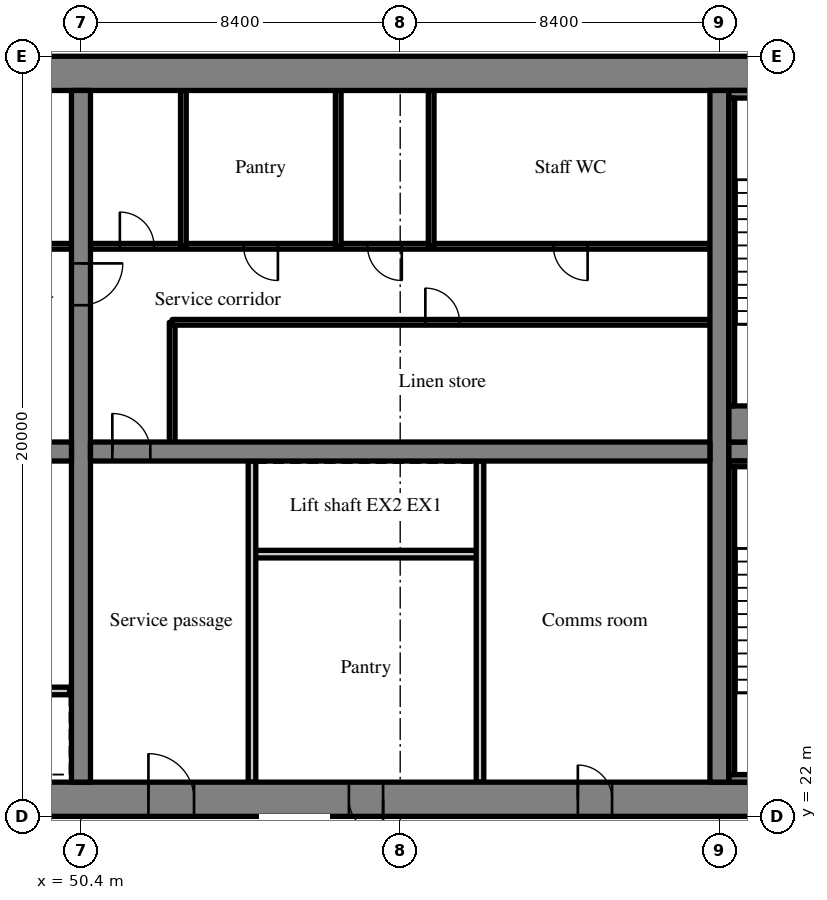
"""IFC4 building model, lengths in metres.
Left out: names, types, materials, properties, quantities, classifications, styles, units other than length and angle.
Written with IfcOpenShell. Run it as: python <this file> out.ifc"""

import sys

from ifc_helpers import new_model, si_unit, direction, frame, frame_2d, origin, place, context, subcontext, project, spatial, rectangle, extrude, source, transform, mapped, element, fill, save


model = new_model("IFC4")
c1 = context("Model", 3, precision=1e-05, world=origin(), true_north=direction((0.0, 1.0)))
c2 = subcontext(c1, "Body", "Model", "MODEL_VIEW")
j1 = project(units=[si_unit("LENGTHUNIT", "METRE"), si_unit("PLANEANGLEUNIT", "RADIAN")], contexts=[c1])
p1 = place(None, origin())
s1 = spatial("IfcSite", under=j1, at=p1, CompositionType="ELEMENT")
p2 = place(p1, origin())
s2 = spatial("IfcBuilding", under=s1, at=p2, CompositionType="ELEMENT")
p3 = place(p2, frame((0.0, 0.0, 99.0)))
s3 = spatial("IfcBuildingStorey", under=s2, at=p3, CompositionType="ELEMENT", Elevation=99.0)
m1 = source(origin(), c2, "Body", "SweptSolid", [
    extrude(rectangle(XDim=50.4, YDim=0.9, at=frame_2d((25.2, 0.0))), origin(), (0.0, 0.0, 1.0), 3.52),
])
p4 = place(p3, frame((25.2, 22.45, 0.0), z_axis=(0.0, 0.0, 1.0), x_axis=(1.0, 0.0, 0.0)))
e1 = element("IfcWall", 1, at=p4, inside=s3, PredefinedType="SHEAR", context=c2, shape_type="MappedRepresentation", body=[
    mapped(m1, transform((0.0, 0.0, 0.0), scale=1.0)),
])
m2 = source(origin(), c2, "Body", "SweptSolid", [
    extrude(rectangle(XDim=1.8, YDim=2.1, at=frame_2d((0.9, 1.05))), frame((0.0, 0.46, 0.0), z_axis=(0.0, -1.0, 0.0), x_axis=(1.0, 0.0, 0.0)), (0.0, 0.0, 1.0), 0.92),
])
p5 = place(p4, frame((15.9, 0.0, 0.0)))
e2 = element("IfcOpeningElement", 2, at=p5, cuts=e1, PredefinedType="OPENING", context=c2, shape_type="MappedRepresentation", body=[
    mapped(m2, transform((0.0, 0.0, 0.0), scale=1.0)),
])
m3 = source(origin(), c2, "Body", "SweptSolid", [
    extrude(rectangle(XDim=1.2, YDim=2.1, at=frame_2d((0.6, 1.05))), frame((0.0, 0.46, 0.0), z_axis=(0.0, -1.0, 0.0), x_axis=(1.0, 0.0, 0.0)), (0.0, 0.0, 1.0), 0.92),
])
p6 = place(p4, frame((26.975, 0.0, 0.0)))
e3 = element("IfcOpeningElement", 3, at=p6, cuts=e1, PredefinedType="OPENING", context=c2, shape_type="MappedRepresentation", body=[
    mapped(m3, transform((0.0, 0.0, 0.0), scale=1.0)),
])
m4 = source(origin(), c2, "Body", "SweptSolid", [
    extrude(rectangle(XDim=0.9, YDim=2.1, at=frame_2d((0.45, 1.05))), frame((0.0, 0.46, 0.0), z_axis=(0.0, -1.0, 0.0), x_axis=(1.0, 0.0, 0.0)), (0.0, 0.0, 1.0), 0.92),
])
p7 = place(p4, frame((32.25, 0.0, 0.0)))
e4 = element("IfcOpeningElement", 4, at=p7, cuts=e1, PredefinedType="OPENING", context=c2, shape_type="MappedRepresentation", body=[
    mapped(m4, transform((0.0, 0.0, 0.0), scale=1.0)),
])
p8 = place(p4, frame((38.275, 0.0, 0.0)))
e5 = element("IfcOpeningElement", 5, at=p8, cuts=e1, PredefinedType="OPENING", context=c2, shape_type="MappedRepresentation", body=[
    mapped(m4, transform((0.0, 0.0, 0.0), scale=1.0)),
])
p9 = place(p4, frame((6.45, 0.0, 0.0)))
e6 = element("IfcOpeningElement", 6, at=p9, cuts=e1, PredefinedType="OPENING", context=c2, shape_type="MappedRepresentation", body=[
    mapped(m3, transform((0.0, 0.0, 0.0), scale=1.0)),
])
p10 = place(p4, frame((47.775, 0.0, 0.0)))
e7 = element("IfcOpeningElement", 7, at=p10, cuts=e1, PredefinedType="OPENING", context=c2, shape_type="MappedRepresentation", body=[
    mapped(m3, transform((0.0, 0.0, 0.0), scale=1.0)),
])
p11 = place(p3, frame((25.2, 41.55, 0.0), z_axis=(0.0, 0.0, 1.0), x_axis=(1.0, 0.0, 0.0)))
e8 = element("IfcWall", 8, at=p11, inside=s3, PredefinedType="SHEAR", context=c2, shape_type="MappedRepresentation", body=[
    mapped(m1, transform((0.0, 0.0, 0.0), scale=1.0)),
])
m5 = source(origin(), c2, "Body", "SweptSolid", [
    extrude(rectangle(XDim=18.2, YDim=0.5, at=frame_2d((9.1, 0.0))), origin(), (0.0, 0.0, 1.0), 3.52),
])
p12 = place(p3, frame((50.4, 22.9, 0.0), z_axis=(0.0, 0.0, 1.0), x_axis=(0.0, 1.0, 0.0)))
e9 = element("IfcWall", 9, at=p12, inside=s3, PredefinedType="SHEAR", context=c2, shape_type="MappedRepresentation", body=[
    mapped(m5, transform((0.0, 0.0, 0.0), scale=1.0)),
])
m6 = source(origin(), c2, "Body", "SweptSolid", [
    extrude(rectangle(XDim=1.1, YDim=2.1, at=frame_2d((0.55, 1.05))), frame((0.0, 0.26, 0.0), z_axis=(0.0, -1.0, 0.0), x_axis=(1.0, 0.0, 0.0)), (0.0, 0.0, 1.0), 0.52),
])
p13 = place(p12, frame((12.55, 0.0, 0.0)))
e10 = element("IfcOpeningElement", 10, at=p13, cuts=e9, PredefinedType="OPENING", context=c2, shape_type="MappedRepresentation", body=[
    mapped(m6, transform((0.0, 0.0, 0.0), scale=1.0)),
])
p14 = place(p3, frame((67.2, 22.9, 0.0), z_axis=(0.0, 0.0, 1.0), x_axis=(0.0, 1.0, 0.0)))
e11 = element("IfcWall", 11, at=p14, inside=s3, PredefinedType="SHEAR", context=c2, shape_type="MappedRepresentation", body=[
    mapped(m5, transform((0.0, 0.0, 0.0), scale=1.0)),
])
m7 = source(origin(), c2, "Body", "SweptSolid", [
    extrude(rectangle(XDim=16.3, YDim=0.5, at=frame_2d((8.15, 0.0))), origin(), (0.0, 0.0, 1.0), 3.52),
])
p15 = place(p3, frame((33.85, 31.6, 0.0), z_axis=(0.0, 0.0, 1.0), x_axis=(1.0, 0.0, 0.0)))
e12 = element("IfcWall", 12, at=p15, inside=s3, PredefinedType="SHEAR", context=c2, shape_type="MappedRepresentation", body=[
    mapped(m7, transform((0.0, 0.0, 0.0), scale=1.0)),
])
m8 = source(origin(), c2, "Body", "SweptSolid", [
    extrude(rectangle(XDim=1.0, YDim=2.1, at=frame_2d((0.5, 1.05))), frame((0.0, 0.26, 0.0), z_axis=(0.0, -1.0, 0.0), x_axis=(1.0, 0.0, 0.0)), (0.0, 0.0, 1.0), 0.52),
])
p16 = place(p15, frame((14.725, 0.0, 0.0)))
e13 = element("IfcOpeningElement", 13, at=p16, cuts=e12, PredefinedType="OPENING", context=c2, shape_type="MappedRepresentation", body=[
    mapped(m8, transform((0.0, 0.0, 0.0), scale=1.0)),
])
m9 = source(origin(), c2, "Body", "SweptSolid", [
    extrude(rectangle(XDim=16.3, YDim=0.5, at=frame_2d((8.15, 0.0))), origin(), (0.0, 0.0, 1.0), 3.52),
])
p17 = place(p3, frame((50.65, 31.6, 0.0), z_axis=(0.0, 0.0, 1.0), x_axis=(1.0, 0.0, 0.0)))
e14 = element("IfcWall", 14, at=p17, inside=s3, PredefinedType="SHEAR", context=c2, shape_type="MappedRepresentation", body=[
    mapped(m9, transform((0.0, 0.0, 0.0), scale=1.0)),
])
p18 = place(p17, frame((0.575, 0.0, 0.0)))
e15 = element("IfcOpeningElement", 15, at=p18, cuts=e14, PredefinedType="OPENING", context=c2, shape_type="MappedRepresentation", body=[
    mapped(m8, transform((0.0, 0.0, 0.0), scale=1.0)),
])
m10 = source(origin(), c2, "Body", "SweptSolid", [
    extrude(rectangle(XDim=7.25, YDim=0.5, at=frame_2d((3.625, 0.0))), origin(), (0.0, 0.0, 1.0), 3.52),
])
p19 = place(p3, frame((67.45, 31.6, 0.0), z_axis=(0.0, 0.0, 1.0), x_axis=(1.0, 0.0, 0.0)))
e16 = element("IfcWall", 16, at=p19, inside=s3, PredefinedType="SHEAR", context=c2, shape_type="MappedRepresentation", body=[
    mapped(m10, transform((0.0, 0.0, 0.0), scale=1.0)),
])
p20 = place(p19, frame((5.575, 0.0, 0.0)))
e17 = element("IfcOpeningElement", 17, at=p20, cuts=e16, PredefinedType="OPENING", context=c2, shape_type="MappedRepresentation", body=[
    mapped(m6, transform((0.0, 0.0, 0.0), scale=1.0)),
])
m11 = source(origin(), c2, "Body", "SweptSolid", [
    extrude(rectangle(XDim=6.0, YDim=0.2, at=frame_2d((3.0, 0.0))), origin(), (0.0, 0.0, 1.0), 3.52),
])
p21 = place(p3, frame((44.1, 25.3, 0.0), z_axis=(0.0, 0.0, 1.0), x_axis=(1.0, 0.0, 0.0)))
e18 = element("IfcWall", 18, at=p21, inside=s3, PredefinedType="SOLIDWALL", context=c2, shape_type="MappedRepresentation", body=[
    mapped(m11, transform((0.0, 0.0, 0.0), scale=1.0)),
])
m12 = source(origin(), c2, "Body", "SweptSolid", [
    extrude(rectangle(XDim=1.1, YDim=2.1, at=frame_2d((0.55, 1.05))), frame((0.0, 0.11, 0.0), z_axis=(0.0, -1.0, 0.0), x_axis=(1.0, 0.0, 0.0)), (0.0, 0.0, 1.0), 0.22),
])
p22 = place(p21, frame((0.95, 0.0, 0.0)))
e19 = element("IfcOpeningElement", 19, at=p22, cuts=e18, PredefinedType="OPENING", context=c2, shape_type="MappedRepresentation", body=[
    mapped(m12, transform((0.0, 0.0, 0.0), scale=1.0)),
])
p23 = place(p21, frame((3.95, 0.0, 0.0)))
e20 = element("IfcOpeningElement", 20, at=p23, cuts=e18, PredefinedType="OPENING", context=c2, shape_type="MappedRepresentation", body=[
    mapped(m12, transform((0.0, 0.0, 0.0), scale=1.0)),
])
m13 = source(origin(), c2, "Body", "SweptSolid", [
    extrude(rectangle(XDim=16.3, YDim=0.15, at=frame_2d((8.15, 0.0))), origin(), (0.0, 0.0, 1.0), 3.52),
])
p24 = place(p3, frame((33.85, 37.0, 0.0), z_axis=(0.0, 0.0, 1.0), x_axis=(1.0, 0.0, 0.0)))
e21 = element("IfcWall", 21, at=p24, inside=s3, PredefinedType="PARTITIONING", context=c2, shape_type="MappedRepresentation", body=[
    mapped(m13, transform((0.0, 0.0, 0.0), scale=1.0)),
])
m14 = source(origin(), c2, "Body", "SweptSolid", [
    extrude(rectangle(XDim=0.9, YDim=2.1, at=frame_2d((0.45, 1.05))), frame((0.0, 0.085, 0.0), z_axis=(0.0, -1.0, 0.0), x_axis=(1.0, 0.0, 0.0)), (0.0, 0.0, 1.0), 0.17),
])
p25 = place(p24, frame((1.588, 0.0, 0.0)))
e22 = element("IfcOpeningElement", 22, at=p25, cuts=e21, PredefinedType="OPENING", context=c2, shape_type="MappedRepresentation", body=[
    mapped(m14, transform((0.0, 0.0, 0.0), scale=1.0)),
])
p26 = place(p24, frame((7.293, 0.0, 0.0)))
e23 = element("IfcOpeningElement", 23, at=p26, cuts=e21, PredefinedType="OPENING", context=c2, shape_type="MappedRepresentation", body=[
    mapped(m14, transform((0.0, 0.0, 0.0), scale=1.0)),
])
p27 = place(p24, frame((12.183, 0.0, 0.0)))
e24 = element("IfcOpeningElement", 24, at=p27, cuts=e21, PredefinedType="OPENING", context=c2, shape_type="MappedRepresentation", body=[
    mapped(m14, transform((0.0, 0.0, 0.0), scale=1.0)),
])
p28 = place(p24, frame((14.627, 0.0, 0.0)))
e25 = element("IfcOpeningElement", 25, at=p28, cuts=e21, PredefinedType="OPENING", context=c2, shape_type="MappedRepresentation", body=[
    mapped(m14, transform((0.0, 0.0, 0.0), scale=1.0)),
])
p29 = place(p3, frame((60.9, 28.9, 0.0), z_axis=(0.0, 0.0, 1.0), x_axis=(-1.0, 0.0, 0.0)))
e26 = element("IfcWall", 26, at=p29, inside=s3, PredefinedType="SOLIDWALL", context=c2, shape_type="MappedRepresentation", body=[
    mapped(m11, transform((0.0, 0.0, 0.0), scale=1.0)),
])
m15 = source(origin(), c2, "Body", "SweptSolid", [
    extrude(rectangle(XDim=8.45, YDim=0.2, at=frame_2d((4.225, 0.0))), origin(), (0.0, 0.0, 1.0), 3.52),
])
for number, where, z_axis, x_axis in (
    (27, (54.9, 22.9, 0.0), (0.0, 0.0, 1.0), (0.0, 1.0, 0.0)),
    (28, (60.9, 22.9, 0.0), (0.0, 0.0, 1.0), (0.0, 1.0, 0.0)),
):
    element("IfcWall", number, at=place(p3, frame(where, z_axis=z_axis, x_axis=x_axis)), inside=s3, PredefinedType="PARTITIONING", context=c2, shape_type="MappedRepresentation", body=[
        mapped(m15, transform((0.0, 0.0, 0.0), scale=1.0)),
    ])
m16 = source(origin(), c2, "Body", "SweptSolid", [
    extrude(rectangle(XDim=3.15, YDim=0.15, at=frame_2d((1.575, 0.0))), origin(), (0.0, 0.0, 1.0), 3.52),
])
p30 = place(p3, frame((52.8, 31.85, 0.0), z_axis=(0.0, 0.0, 1.0), x_axis=(0.0, 1.0, 0.0)))
e29 = element("IfcWall", 29, at=p30, inside=s3, PredefinedType="PARTITIONING", context=c2, shape_type="MappedRepresentation", body=[
    mapped(m16, transform((0.0, 0.0, 0.0), scale=1.0)),
])
m17 = source(origin(), c2, "Body", "SweptSolid", [
    extrude(rectangle(XDim=14.15, YDim=0.15, at=frame_2d((7.075, 0.0))), origin(), (0.0, 0.0, 1.0), 3.52),
])
p31 = place(p3, frame((66.95, 35.0, 0.0), z_axis=(0.0, 0.0, 1.0), x_axis=(-1.0, 0.0, 0.0)))
e30 = element("IfcWall", 30, at=p31, inside=s3, PredefinedType="PARTITIONING", context=c2, shape_type="MappedRepresentation", body=[
    mapped(m17, transform((0.0, 0.0, 0.0), scale=1.0)),
])
p32 = place(p31, frame((6.588, 0.0, 0.0)))
e31 = element("IfcOpeningElement", 31, at=p32, cuts=e30, PredefinedType="OPENING", context=c2, shape_type="MappedRepresentation", body=[
    mapped(m14, transform((0.0, 0.0, 0.0), scale=1.0)),
])
m18 = source(origin(), c2, "Body", "SweptSolid", [
    extrude(rectangle(XDim=16.3, YDim=0.15, at=frame_2d((8.15, 0.0))), origin(), (0.0, 0.0, 1.0), 3.52),
])
p33 = place(p3, frame((66.95, 37.0, 0.0), z_axis=(0.0, 0.0, 1.0), x_axis=(-1.0, 0.0, 0.0)))
e32 = element("IfcWall", 32, at=p33, inside=s3, PredefinedType="PARTITIONING", context=c2, shape_type="MappedRepresentation", body=[
    mapped(m18, transform((0.0, 0.0, 0.0), scale=1.0)),
])
p34 = place(p33, frame((3.218, 0.0, 0.0)))
e33 = element("IfcOpeningElement", 33, at=p34, cuts=e32, PredefinedType="OPENING", context=c2, shape_type="MappedRepresentation", body=[
    mapped(m14, transform((0.0, 0.0, 0.0), scale=1.0)),
])
p35 = place(p33, frame((8.108, 0.0, 0.0)))
e34 = element("IfcOpeningElement", 34, at=p35, cuts=e32, PredefinedType="OPENING", context=c2, shape_type="MappedRepresentation", body=[
    mapped(m14, transform((0.0, 0.0, 0.0), scale=1.0)),
])
p36 = place(p33, frame((11.368, 0.0, 0.0)))
e35 = element("IfcOpeningElement", 35, at=p36, cuts=e32, PredefinedType="OPENING", context=c2, shape_type="MappedRepresentation", body=[
    mapped(m14, transform((0.0, 0.0, 0.0), scale=1.0)),
])
p37 = place(p33, frame((14.627, 0.0, 0.0)))
e36 = element("IfcOpeningElement", 36, at=p37, cuts=e32, PredefinedType="OPENING", context=c2, shape_type="MappedRepresentation", body=[
    mapped(m14, transform((0.0, 0.0, 0.0), scale=1.0)),
])
m19 = source(origin(), c2, "Body", "SweptSolid", [
    extrude(rectangle(XDim=4.1, YDim=0.15, at=frame_2d((2.05, 0.0))), origin(), (0.0, 0.0, 1.0), 3.52),
])
for number, where, z_axis, x_axis in (
    (37, (59.615, 37.0, 0.0), (0.0, 0.0, 1.0), (0.0, 1.0, 0.0)),
    (38, (57.17, 37.0, 0.0), (0.0, 0.0, 1.0), (0.0, 1.0, 0.0)),
    (39, (53.095, 37.0, 0.0), (0.0, 0.0, 1.0), (0.0, 1.0, 0.0)),
):
    element("IfcWall", number, at=place(p3, frame(where, z_axis=z_axis, x_axis=x_axis)), inside=s3, PredefinedType="PARTITIONING", context=c2, shape_type="MappedRepresentation", body=[
        mapped(m19, transform((0.0, 0.0, 0.0), scale=1.0)),
    ])
m20 = source(origin(), c2, "Body", "SweptSolid", [
    extrude(rectangle(XDim=4.8, YDim=0.2, at=frame_2d((2.4, 0.0))), origin(), (0.0, 0.0, 1.0), 3.52),
])
p38 = place(p3, frame((67.45, 23.0, 0.0), z_axis=(0.0, 0.0, 1.0), x_axis=(1.0, 0.0, 0.0)))
e40 = element("IfcWall", 40, at=p38, inside=s3, PredefinedType="SOLIDWALL", context=c2, shape_type="MappedRepresentation", body=[
    mapped(m20, transform((0.0, 0.0, 0.0), scale=1.0)),
])
m21 = source(origin(), c2, "Body", "SweptSolid", [
    extrude(rectangle(XDim=4.8, YDim=0.15, at=frame_2d((2.4, 0.0))), origin(), (0.0, 0.0, 1.0), 3.52),
])
p39 = place(p3, frame((67.45, 31.275, 0.0), z_axis=(0.0, 0.0, 1.0), x_axis=(1.0, 0.0, 0.0)))
e41 = element("IfcWall", 41, at=p39, inside=s3, PredefinedType="SOLIDWALL", context=c2, shape_type="MappedRepresentation", body=[
    mapped(m21, transform((0.0, 0.0, 0.0), scale=1.0)),
])
m22 = source(origin(), c2, "Body", "SweptSolid", [
    extrude(rectangle(XDim=8.1, YDim=0.15, at=frame_2d((4.05, 0.0))), origin(), (0.0, 0.0, 1.0), 3.52),
])
p40 = place(p3, frame((67.525, 23.1, 0.0), z_axis=(0.0, 0.0, 1.0), x_axis=(0.0, 1.0, 0.0)))
e42 = element("IfcWall", 42, at=p40, inside=s3, PredefinedType="SOLIDWALL", context=c2, shape_type="MappedRepresentation", body=[
    mapped(m22, transform((0.0, 0.0, 0.0), scale=1.0)),
])
p41 = place(p3, frame((67.45, 41.0, 0.0), z_axis=(0.0, 0.0, 1.0), x_axis=(1.0, 0.0, 0.0)))
e43 = element("IfcWall", 43, at=p41, inside=s3, PredefinedType="SOLIDWALL", context=c2, shape_type="MappedRepresentation", body=[
    mapped(m20, transform((0.0, 0.0, 0.0), scale=1.0)),
])
m23 = source(origin(), c2, "Body", "SweptSolid", [
    extrude(rectangle(XDim=4.8, YDim=0.95, at=frame_2d((2.4, 0.0))), origin(), (0.0, 0.0, 1.0), 3.52),
])
p42 = place(p3, frame((67.45, 32.325, 0.0), z_axis=(0.0, 0.0, 1.0), x_axis=(1.0, 0.0, 0.0)))
e44 = element("IfcWall", 44, at=p42, inside=s3, PredefinedType="SOLIDWALL", context=c2, shape_type="MappedRepresentation", body=[
    mapped(m23, transform((0.0, 0.0, 0.0), scale=1.0)),
])
p43 = place(p3, frame((67.525, 32.8, 0.0), z_axis=(0.0, 0.0, 1.0), x_axis=(0.0, 1.0, 0.0)))
e45 = element("IfcWall", 45, at=p43, inside=s3, PredefinedType="SOLIDWALL", context=c2, shape_type="MappedRepresentation", body=[
    mapped(m22, transform((0.0, 0.0, 0.0), scale=1.0)),
])
m24 = source(origin(), c2, "Body", "SweptSolid", [
    extrude(rectangle(XDim=1.2, YDim=2.1, at=frame_2d((0.6, 1.05))), frame((0.0, 0.375, 0.0), z_axis=(0.0, -1.0, 0.0), x_axis=(1.0, 0.0, 0.0)), (0.0, 0.0, 1.0), 0.05),
])
p44 = place(p6, origin())
e46 = element("IfcDoor", 46, at=p44, inside=s3, OperationType="SINGLE_SWING_LEFT", PredefinedType="DOOR", context=c2, shape_type="MappedRepresentation", body=[
    mapped(m24, transform((0.0, 0.0, 0.0), scale=1.0)),
])
fill(e3, e46)
m25 = source(origin(), c2, "Body", "SweptSolid", [
    extrude(rectangle(XDim=1.0, YDim=2.1, at=frame_2d((0.5, 1.05))), frame((0.0, 0.025, 0.0), z_axis=(0.0, -1.0, 0.0), x_axis=(1.0, 0.0, 0.0)), (0.0, 0.0, 1.0), 0.05),
])
p45 = place(p18, origin())
e47 = element("IfcDoor", 47, at=p45, inside=s3, OperationType="SINGLE_SWING_LEFT", PredefinedType="DOOR", context=c2, shape_type="MappedRepresentation", body=[
    mapped(m25, transform((0.0, 0.0, 0.0), scale=1.0)),
])
fill(e15, e47)
m26 = source(origin(), c2, "Body", "SweptSolid", [
    extrude(rectangle(XDim=0.9, YDim=2.1, at=frame_2d((0.45, 1.05))), frame((0.0, 0.375, 0.0), z_axis=(0.0, -1.0, 0.0), x_axis=(1.0, 0.0, 0.0)), (0.0, 0.0, 1.0), 0.05),
])
p46 = place(p7, origin())
e48 = element("IfcDoor", 48, at=p46, inside=s3, OperationType="SINGLE_SWING_RIGHT", PredefinedType="DOOR", context=c2, shape_type="MappedRepresentation", body=[
    mapped(m26, transform((0.0, 0.0, 0.0), scale=1.0)),
])
fill(e4, e48)
p47 = place(p8, origin())
e49 = element("IfcDoor", 49, at=p47, inside=s3, OperationType="SINGLE_SWING_LEFT", PredefinedType="DOOR", context=c2, shape_type="MappedRepresentation", body=[
    mapped(m26, transform((0.0, 0.0, 0.0), scale=1.0)),
])
fill(e5, e49)
m27 = source(origin(), c2, "Body", "SweptSolid", [
    extrude(rectangle(XDim=0.9, YDim=2.1, at=frame_2d((0.45, 1.05))), frame((0.0, 0.025, 0.0), z_axis=(0.0, -1.0, 0.0), x_axis=(1.0, 0.0, 0.0)), (0.0, 0.0, 1.0), 0.05),
])
p48 = place(p32, origin())
e50 = element("IfcDoor", 50, at=p48, inside=s3, OperationType="SINGLE_SWING_RIGHT", PredefinedType="DOOR", context=c2, shape_type="MappedRepresentation", body=[
    mapped(m27, transform((0.0, 0.0, 0.0), scale=1.0)),
])
fill(e31, e50)
p49 = place(p34, origin())
e51 = element("IfcDoor", 51, at=p49, inside=s3, OperationType="SINGLE_SWING_LEFT", PredefinedType="DOOR", context=c2, shape_type="MappedRepresentation", body=[
    mapped(m27, transform((0.0, 0.0, 0.0), scale=1.0)),
])
fill(e33, e51)
p50 = place(p35, origin())
e52 = element("IfcDoor", 52, at=p50, inside=s3, OperationType="SINGLE_SWING_LEFT", PredefinedType="DOOR", context=c2, shape_type="MappedRepresentation", body=[
    mapped(m27, transform((0.0, 0.0, 0.0), scale=1.0)),
])
fill(e34, e52)
p51 = place(p36, origin())
e53 = element("IfcDoor", 53, at=p51, inside=s3, OperationType="SINGLE_SWING_LEFT", PredefinedType="DOOR", context=c2, shape_type="MappedRepresentation", body=[
    mapped(m27, transform((0.0, 0.0, 0.0), scale=1.0)),
])
fill(e35, e53)
p52 = place(p37, origin())
e54 = element("IfcDoor", 54, at=p52, inside=s3, OperationType="SINGLE_SWING_RIGHT", PredefinedType="DOOR", context=c2, shape_type="MappedRepresentation", body=[
    mapped(m27, transform((0.0, 0.0, 0.0), scale=1.0)),
])
fill(e36, e54)
m28 = source(origin(), c2, "Body", "SweptSolid", [
    extrude(rectangle(XDim=1.1, YDim=2.1, at=frame_2d((0.55, 1.05))), frame((0.0, 0.025, 0.0), z_axis=(0.0, -1.0, 0.0), x_axis=(1.0, 0.0, 0.0)), (0.0, 0.0, 1.0), 0.05),
])
p53 = place(p13, origin())
e55 = element("IfcDoor", 55, at=p53, inside=s3, OperationType="SINGLE_SWING_RIGHT", PredefinedType="DOOR", context=c2, shape_type="MappedRepresentation", body=[
    mapped(m28, transform((0.0, 0.0, 0.0), scale=1.0)),
])
fill(e10, e55)
save(model, sys.argv[1])
